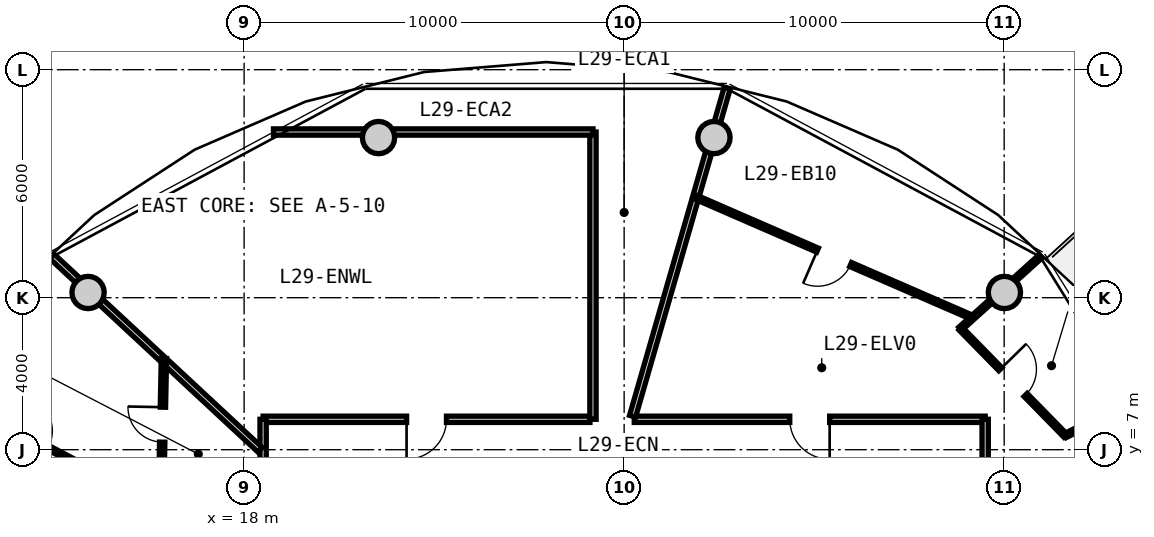
"""IFC4 building model, lengths in metres.
Left out: names, types, materials, properties, quantities, classifications, styles, units other than length and angle.
Written with IfcOpenShell. Run it as: python <this file> out.ifc"""

import sys

from ifc_helpers import new_model, si_unit, direction, frame, frame_2d, origin, origin_2d, place, context, subcontext, project, spatial, rectangle, circle, extrude, source, transform, mapped, element, fill, save


model = new_model("IFC4")
c1 = context("Model", 3, precision=1e-05, world=origin(), true_north=direction((0.0, 1.0)))
c2 = subcontext(c1, "Body", "Model", "MODEL_VIEW")
j1 = project(units=[si_unit("LENGTHUNIT", "METRE"), si_unit("PLANEANGLEUNIT", "RADIAN")], contexts=[c1])
p1 = place(None, origin())
s1 = spatial("IfcSite", under=j1, at=p1, CompositionType="ELEMENT")
p2 = place(p1, origin())
s2 = spatial("IfcBuilding", under=s1, at=p2, CompositionType="ELEMENT")
p3 = place(p2, frame((0.0, 0.0, 96.25)))
s3 = spatial("IfcBuildingStorey", under=s2, at=p3, CompositionType="ELEMENT", Elevation=96.25)
m1 = source(origin(), c2, "Body", "SweptSolid", [
    extrude(circle(Radius=0.425, at=origin_2d()), origin(), (0.0, 0.0, 1.0), 3.05),
])
for number, where, z_axis, x_axis in (
    (1, (38.006, 11.137, 0.0), (0.0, 0.0, 1.0), (1.0, 0.0, 0.0)),
    (2, (30.363, 15.213, 0.0), (0.0, 0.0, 1.0), (1.0, 0.0, 0.0)),
    (3, (21.537, 15.213, 0.0), (0.0, 0.0, 1.0), (1.0, 0.0, 0.0)),
    (4, (13.894, 11.137, 0.0), (0.0, 0.0, 1.0), (1.0, 0.0, 0.0)),
):
    element("IfcColumn", number, at=place(p3, frame(where, z_axis=z_axis, x_axis=x_axis)), inside=s3, PredefinedType="COLUMN", context=c2, shape_type="MappedRepresentation", body=[
        mapped(m1, transform((0.0, 0.0, 0.0), x_axis=(1.0, 0.0, 0.0), y_axis=(0.0, 1.0, 0.0), z_axis=(0.0, 0.0, 1.0), scale=1.0)),
    ])
m2 = source(origin(), c2, "Body", "SweptSolid", [
    extrude(rectangle(XDim=8.6, YDim=0.165, at=frame_2d((4.3, 0.0))), origin(), (0.0, 0.0, 1.0), 2.775),
])
p4 = place(p3, frame((18.5, 7.8, 0.0), z_axis=(0.0, 0.0, 1.0), x_axis=(1.0, 0.0, 0.0)))
e5 = element("IfcWall", 5, at=p4, inside=s3, PredefinedType="PARTITIONING", context=c2, shape_type="MappedRepresentation", body=[
    mapped(m2, transform((0.0, 0.0, 0.0), x_axis=(1.0, 0.0, 0.0), y_axis=(0.0, 1.0, 0.0), z_axis=(0.0, 0.0, 1.0), scale=1.0)),
])
p5 = place(p4, frame((3.775, 0.0, 0.0)))
e6 = element("IfcOpeningElement", 6, at=p5, cuts=e5, PredefinedType="OPENING", context=c2, shape_type="SweptSolid", body=[
    extrude(rectangle(XDim=1.05, YDim=2.15, at=frame_2d((0.525, 1.075))), frame((0.0, 0.093, 0.0), z_axis=(0.0, -1.0, 0.0), x_axis=(1.0, 0.0, 0.0)), (0.0, 0.0, 1.0), 0.185),
])
m3 = source(origin(), c2, "Body", "SweptSolid", [
    extrude(rectangle(XDim=9.234, YDim=0.165, at=frame_2d((4.617, 0.0))), origin(), (0.0, 0.0, 1.0), 2.775),
])
p6 = place(p3, frame((28.266, 7.8, 0.0), z_axis=(0.0, 0.0, 1.0), x_axis=(1.0, 0.0, 0.0)))
e7 = element("IfcWall", 7, at=p6, inside=s3, PredefinedType="PARTITIONING", context=c2, shape_type="MappedRepresentation", body=[
    mapped(m3, transform((0.0, 0.0, 0.0), x_axis=(1.0, 0.0, 0.0), y_axis=(0.0, 1.0, 0.0), z_axis=(0.0, 0.0, 1.0), scale=1.0)),
])
p7 = place(p6, frame((4.092, 0.0, 0.0)))
e8 = element("IfcOpeningElement", 8, at=p7, cuts=e7, PredefinedType="OPENING", context=c2, shape_type="SweptSolid", body=[
    extrude(rectangle(XDim=1.05, YDim=2.15, at=frame_2d((0.525, 1.075))), frame((0.0, 0.093, 0.0), z_axis=(0.0, -1.0, 0.0), x_axis=(1.0, 0.0, 0.0)), (0.0, 0.0, 1.0), 0.185),
])
m4 = source(origin(), c2, "Body", "SweptSolid", [
    extrude(rectangle(XDim=15.6, YDim=0.165, at=frame_2d((7.8, 0.0))), origin(), (0.0, 0.0, 1.0), 2.775),
])
p8 = place(p3, frame((18.5, -7.8, 0.0), z_axis=(0.0, 0.0, 1.0), x_axis=(0.0, 1.0, 0.0)))
e9 = element("IfcWall", 9, at=p8, inside=s3, PredefinedType="PARTITIONING", context=c2, shape_type="MappedRepresentation", body=[
    mapped(m4, transform((0.0, 0.0, 0.0), x_axis=(1.0, 0.0, 0.0), y_axis=(0.0, 1.0, 0.0), z_axis=(0.0, 0.0, 1.0), scale=1.0)),
])
p9 = place(p8, frame((5.673, 0.0, 0.0)))
e10 = element("IfcOpeningElement", 10, at=p9, cuts=e9, PredefinedType="OPENING", context=c2, shape_type="SweptSolid", body=[
    extrude(rectangle(XDim=1.05, YDim=2.15, at=frame_2d((0.525, 1.075))), frame((0.0, 0.093, 0.0), z_axis=(0.0, -1.0, 0.0), x_axis=(1.0, 0.0, 0.0)), (0.0, 0.0, 1.0), 0.185),
])
p10 = place(p3, frame((37.5, 7.8, 0.0), z_axis=(0.0, 0.0, 1.0), x_axis=(0.0, -1.0, 0.0)))
e11 = element("IfcWall", 11, at=p10, inside=s3, PredefinedType="PARTITIONING", context=c2, shape_type="MappedRepresentation", body=[
    mapped(m4, transform((0.0, 0.0, 0.0), x_axis=(1.0, 0.0, 0.0), y_axis=(0.0, 1.0, 0.0), z_axis=(0.0, 0.0, 1.0), scale=1.0)),
])
p11 = place(p10, frame((9.482, 0.0, 0.0)))
e12 = element("IfcOpeningElement", 12, at=p11, cuts=e11, PredefinedType="OPENING", context=c2, shape_type="SweptSolid", body=[
    extrude(rectangle(XDim=1.25, YDim=2.2, at=frame_2d((0.625, 1.1))), frame((0.0, 0.093, 0.0), z_axis=(0.0, -1.0, 0.0), x_axis=(1.0, 0.0, 0.0)), (0.0, 0.0, 1.0), 0.185),
])
m5 = source(origin(), c2, "Body", "SweptSolid", [
    extrude(rectangle(XDim=8.989, YDim=0.165, at=frame_2d((4.495, 0.0))), origin(), (0.0, 0.0, 1.0), 2.275),
])
p12 = place(p3, frame((28.222, 7.88, 0.0), z_axis=(0.0, 0.0, 1.0), x_axis=(0.27702323008, 0.960863221274, 0.0)))
e13 = element("IfcWall", 13, at=p12, inside=s3, PredefinedType="PARTITIONING", context=c2, shape_type="MappedRepresentation", body=[
    mapped(m5, transform((0.0, 0.0, 0.0), x_axis=(1.0, 0.0, 0.0), y_axis=(0.0, 1.0, 0.0), z_axis=(0.0, 0.0, 1.0), scale=1.0)),
])
m6 = source(origin(), c2, "Body", "SweptSolid", [
    extrude(rectangle(XDim=7.482, YDim=0.165, at=frame_2d((3.741, 0.0))), origin(), (0.0, 0.0, 1.0), 2.275),
])
p13 = place(p3, frame((18.42, 6.998, 0.0), z_axis=(0.0, 0.0, 1.0), x_axis=(-0.732508698043, 0.680757671489, 0.0)))
e14 = element("IfcWall", 14, at=p13, inside=s3, PredefinedType="PARTITIONING", context=c2, shape_type="MappedRepresentation", body=[
    mapped(m6, transform((0.0, 0.0, 0.0), x_axis=(1.0, 0.0, 0.0), y_axis=(0.0, 1.0, 0.0), z_axis=(0.0, 0.0, 1.0), scale=1.0)),
])
m7 = source(origin(), c2, "Body", "SweptSolid", [
    extrude(rectangle(XDim=7.56, YDim=0.165, at=frame_2d((3.78, 0.0))), origin(), (0.0, 0.0, 1.0), 2.775),
])
p14 = place(p3, frame((27.18, 7.8, 0.0), z_axis=(0.0, 0.0, 1.0), x_axis=(0.0, 1.0, 0.0)))
e15 = element("IfcWall", 15, at=p14, inside=s3, PredefinedType="PARTITIONING", context=c2, shape_type="MappedRepresentation", body=[
    mapped(m7, transform((0.0, 0.0, 0.0), x_axis=(1.0, 0.0, 0.0), y_axis=(0.0, 1.0, 0.0), z_axis=(0.0, 0.0, 1.0), scale=1.0)),
])
m8 = source(origin(), c2, "Body", "SweptSolid", [
    extrude(rectangle(XDim=8.407, YDim=0.165, at=frame_2d((4.204, 0.0))), origin(), (0.0, 0.0, 1.0), 2.275),
])
p15 = place(p3, frame((18.773, 15.36, 0.0), z_axis=(0.0, 0.0, 1.0), x_axis=(1.0, 0.0, 0.0)))
e16 = element("IfcWall", 16, at=p15, inside=s3, PredefinedType="PARTITIONING", context=c2, shape_type="MappedRepresentation", body=[
    mapped(m8, transform((0.0, 0.0, 0.0), x_axis=(1.0, 0.0, 0.0), y_axis=(0.0, 1.0, 0.0), z_axis=(0.0, 0.0, 1.0), scale=1.0)),
])
m9 = source(origin(), c2, "Body", "SweptSolid", [
    extrude(rectangle(XDim=3.487, YDim=0.14, at=frame_2d((1.743, 0.0))), origin(), (0.0, 0.0, 1.0), 2.775),
])
p16 = place(p3, frame((15.82, 5.916, 0.0), z_axis=(0.0, 0.0, 1.0), x_axis=(0.020026799331, 0.999799443543, 0.0)))
e17 = element("IfcWall", 17, at=p16, inside=s3, PredefinedType="PARTITIONING", context=c2, shape_type="MappedRepresentation", body=[
    mapped(m9, transform((0.0, 0.0, 0.0), x_axis=(1.0, 0.0, 0.0), y_axis=(0.0, 1.0, 0.0), z_axis=(0.0, 0.0, 1.0), scale=1.0)),
])
p17 = place(p16, frame((1.283, 0.0, 0.0)))
e18 = element("IfcOpeningElement", 18, at=p17, cuts=e17, PredefinedType="OPENING", context=c2, shape_type="SweptSolid", body=[
    extrude(rectangle(XDim=0.92, YDim=2.1, at=frame_2d((0.46, 1.05))), frame((0.0, 0.08, 0.0), z_axis=(0.0, -1.0, 0.0), x_axis=(1.0, 0.0, 0.0)), (0.0, 0.0, 1.0), 0.16),
])
m10 = source(origin(), c2, "Body", "SweptSolid", [
    extrude(rectangle(XDim=4.221, YDim=0.115, at=frame_2d((2.11, 0.0))), origin(), (0.0, 0.0, 1.0), 2.775),
])
p18 = place(p3, frame((14.292, 6.29, 0.0), z_axis=(0.0, 0.0, 1.0), x_axis=(-0.88458298465, 0.466382829087, 0.0)))
e19 = element("IfcWall", 19, at=p18, inside=s3, PredefinedType="PARTITIONING", context=c2, shape_type="MappedRepresentation", body=[
    mapped(m10, transform((0.0, 0.0, 0.0), x_axis=(1.0, 0.0, 0.0), y_axis=(0.0, 1.0, 0.0), z_axis=(0.0, 0.0, 1.0), scale=1.0)),
])
p19 = place(p18, frame((1.635, 0.0, 0.0)))
e20 = element("IfcOpeningElement", 20, at=p19, cuts=e19, PredefinedType="OPENING", context=c2, shape_type="SweptSolid", body=[
    extrude(rectangle(XDim=0.95, YDim=2.1, at=frame_2d((0.475, 1.05))), frame((0.0, 0.067, 0.0), z_axis=(0.0, -1.0, 0.0), x_axis=(1.0, 0.0, 0.0)), (0.0, 0.0, 1.0), 0.135),
])
m11 = source(origin(), c2, "Body", "SweptSolid", [
    extrude(rectangle(XDim=7.938, YDim=0.115, at=frame_2d((3.969, 0.0))), origin(), (0.0, 0.0, 1.0), 2.775),
])
p20 = place(p3, frame((37.164, 10.479, 0.0), z_axis=(0.0, 0.0, 1.0), x_axis=(-0.917052940979, 0.398765474235, 0.0)))
e21 = element("IfcWall", 21, at=p20, inside=s3, PredefinedType="PARTITIONING", context=c2, shape_type="MappedRepresentation", body=[
    mapped(m11, transform((0.0, 0.0, 0.0), x_axis=(1.0, 0.0, 0.0), y_axis=(0.0, 1.0, 0.0), z_axis=(0.0, 0.0, 1.0), scale=1.0)),
])
p21 = place(p20, frame((3.494, 0.0, 0.0)))
e22 = element("IfcOpeningElement", 22, at=p21, cuts=e21, PredefinedType="OPENING", context=c2, shape_type="SweptSolid", body=[
    extrude(rectangle(XDim=0.95, YDim=2.1, at=frame_2d((0.475, 1.05))), frame((0.0, 0.067, 0.0), z_axis=(0.0, -1.0, 0.0), x_axis=(1.0, 0.0, 0.0)), (0.0, 0.0, 1.0), 0.135),
])
m12 = source(origin(), c2, "Body", "SweptSolid", [
    extrude(rectangle(XDim=2.852, YDim=0.115, at=frame_2d((1.426, 0.0))), origin(), (0.0, 0.0, 1.0), 2.275),
])
p22 = place(p3, frame((36.844, 10.18, 0.0), z_axis=(0.0, 0.0, 1.0), x_axis=(0.742190556634, 0.670188911908, 0.0)))
e23 = element("IfcWall", 23, at=p22, inside=s3, PredefinedType="PARTITIONING", context=c2, shape_type="MappedRepresentation", body=[
    mapped(m12, transform((0.0, 0.0, 0.0), x_axis=(1.0, 0.0, 0.0), y_axis=(0.0, 1.0, 0.0), z_axis=(0.0, 0.0, 1.0), scale=1.0)),
])
m13 = source(origin(), c2, "Body", "SweptSolid", [
    extrude(rectangle(XDim=1.945, YDim=0.115, at=frame_2d((0.973, 0.0))), origin(), (0.0, 0.0, 1.0), 2.775),
])
p23 = place(p3, frame((39.611, 7.37, 0.0), z_axis=(0.0, 0.0, 1.0), x_axis=(0.889684148329, 0.456576517368, 0.0)))
e24 = element("IfcWall", 24, at=p23, inside=s3, PredefinedType="PARTITIONING", context=c2, shape_type="MappedRepresentation", body=[
    mapped(m13, transform((0.0, 0.0, 0.0), x_axis=(1.0, 0.0, 0.0), y_axis=(0.0, 1.0, 0.0), z_axis=(0.0, 0.0, 1.0), scale=1.0)),
])
m14 = source(origin(), c2, "Body", "SweptSolid", [
    extrude(rectangle(XDim=3.943, YDim=0.115, at=frame_2d((1.972, 0.0))), origin(), (0.0, 0.0, 1.0), 2.775),
])
p24 = place(p3, frame((39.611, 7.37, 0.0), z_axis=(0.0, 0.0, 1.0), x_axis=(-0.699481885754, 0.714650328134, 0.0)))
e25 = element("IfcWall", 25, at=p24, inside=s3, PredefinedType="PARTITIONING", context=c2, shape_type="MappedRepresentation", body=[
    mapped(m14, transform((0.0, 0.0, 0.0), x_axis=(1.0, 0.0, 0.0), y_axis=(0.0, 1.0, 0.0), z_axis=(0.0, 0.0, 1.0), scale=1.0)),
])
p25 = place(p24, frame((1.497, 0.0, 0.0)))
e26 = element("IfcOpeningElement", 26, at=p25, cuts=e25, PredefinedType="OPENING", context=c2, shape_type="SweptSolid", body=[
    extrude(rectangle(XDim=0.95, YDim=2.1, at=frame_2d((0.475, 1.05))), frame((0.0, 0.067, 0.0), z_axis=(0.0, -1.0, 0.0), x_axis=(1.0, 0.0, 0.0)), (0.0, 0.0, 1.0), 0.135),
])
m15 = source(origin(), c2, "Body", "SweptSolid", [
    extrude(rectangle(XDim=1.05, YDim=2.15, at=frame_2d((0.525, 1.075))), frame((0.0, 0.025, 0.0), z_axis=(0.0, -1.0, 0.0), x_axis=(1.0, 0.0, 0.0)), (0.0, 0.0, 1.0), 0.05),
])
p26 = place(p5, frame((1.05, 0.0, 0.0), z_axis=(0.0, 0.0, 1.0), x_axis=(-1.0, 0.0, 0.0)))
e27 = element("IfcDoor", 27, at=p26, inside=s3, OperationType="SINGLE_SWING_RIGHT", PredefinedType="DOOR", context=c2, shape_type="MappedRepresentation", body=[
    mapped(m15, transform((0.0, 0.0, 0.0), x_axis=(1.0, 0.0, 0.0), y_axis=(0.0, 1.0, 0.0), z_axis=(0.0, 0.0, 1.0), scale=1.0)),
])
fill(e6, e27)
m16 = source(origin(), c2, "Body", "SweptSolid", [
    extrude(rectangle(XDim=0.92, YDim=2.1, at=frame_2d((0.46, 1.05))), frame((0.0, 0.025, 0.0), z_axis=(0.0, -1.0, 0.0), x_axis=(1.0, 0.0, 0.0)), (0.0, 0.0, 1.0), 0.05),
])
p27 = place(p17, origin())
e28 = element("IfcDoor", 28, at=p27, inside=s3, OperationType="SINGLE_SWING_RIGHT", PredefinedType="DOOR", context=c2, shape_type="MappedRepresentation", body=[
    mapped(m16, transform((0.0, 0.0, 0.0), x_axis=(1.0, 0.0, 0.0), y_axis=(0.0, 1.0, 0.0), z_axis=(0.0, 0.0, 1.0), scale=1.0)),
])
fill(e18, e28)
p28 = place(p7, frame((1.05, 0.0, 0.0), z_axis=(0.0, 0.0, 1.0), x_axis=(-1.0, 0.0, 0.0)))
e29 = element("IfcDoor", 29, at=p28, inside=s3, OperationType="SINGLE_SWING_LEFT", PredefinedType="DOOR", context=c2, shape_type="MappedRepresentation", body=[
    mapped(m15, transform((0.0, 0.0, 0.0), x_axis=(1.0, 0.0, 0.0), y_axis=(0.0, 1.0, 0.0), z_axis=(0.0, 0.0, 1.0), scale=1.0)),
])
fill(e8, e29)
m17 = source(origin(), c2, "Body", "SweptSolid", [
    extrude(rectangle(XDim=0.95, YDim=2.1, at=frame_2d((0.475, 1.05))), frame((0.0, 0.025, 0.0), z_axis=(0.0, -1.0, 0.0), x_axis=(1.0, 0.0, 0.0)), (0.0, 0.0, 1.0), 0.05),
])
p29 = place(p25, frame((0.95, 0.0, 0.0), z_axis=(0.0, 0.0, 1.0), x_axis=(-1.0, 0.0, 0.0)))
e30 = element("IfcDoor", 30, at=p29, inside=s3, OperationType="SINGLE_SWING_LEFT", PredefinedType="DOOR", context=c2, shape_type="MappedRepresentation", body=[
    mapped(m17, transform((0.0, 0.0, 0.0), x_axis=(1.0, 0.0, 0.0), y_axis=(0.0, 1.0, 0.0), z_axis=(0.0, 0.0, 1.0), scale=1.0)),
])
fill(e26, e30)
p30 = place(p21, origin())
e31 = element("IfcDoor", 31, at=p30, inside=s3, OperationType="SINGLE_SWING_RIGHT", PredefinedType="DOOR", context=c2, shape_type="MappedRepresentation", body=[
    mapped(m17, transform((0.0, 0.0, 0.0), x_axis=(1.0, 0.0, 0.0), y_axis=(0.0, 1.0, 0.0), z_axis=(0.0, 0.0, 1.0), scale=1.0)),
])
fill(e22, e31)
save(model, sys.argv[1])
